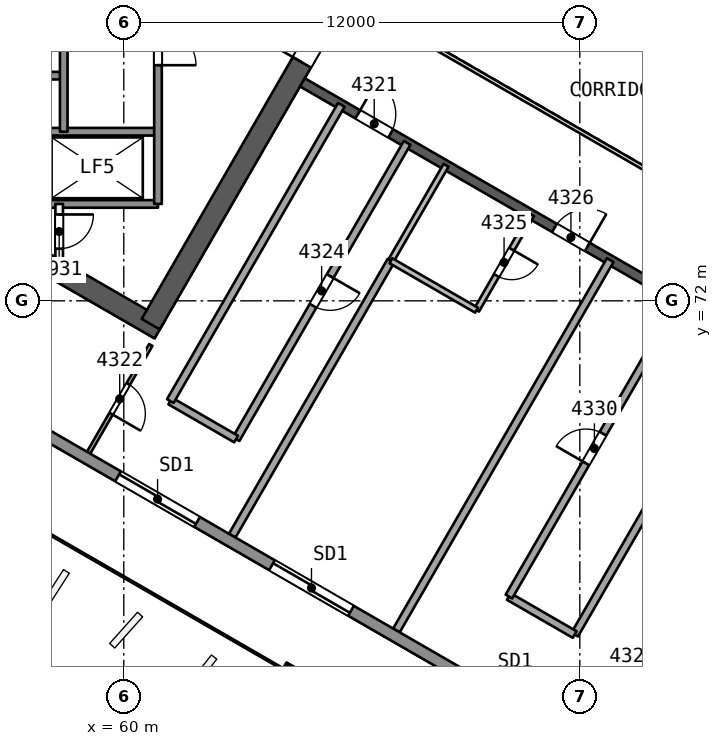
"""IFC4 building model, lengths in metres.
Left out: names, types, materials, properties, quantities, classifications, styles, units other than length and angle.
Written with IfcOpenShell. Run it as: python <this file> out.ifc"""

import sys

from ifc_helpers import new_model, si_unit, direction, frame, frame_2d, origin, origin_2d, place, context, subcontext, project, spatial, rectangle, extrude, element, fill, save


model = new_model("IFC4")
c1 = context("Model", 3, precision=1e-05, world=origin(), true_north=direction((0.0, 1.0)))
c2 = subcontext(c1, "Body", "Model", "MODEL_VIEW")
j1 = project(units=[si_unit("LENGTHUNIT", "METRE"), si_unit("PLANEANGLEUNIT", "RADIAN")], contexts=[c1])
p1 = place(None, origin())
s1 = spatial("IfcSite", under=j1, at=p1, CompositionType="ELEMENT")
p2 = place(p1, origin())
s2 = spatial("IfcBuilding", under=s1, at=p2, CompositionType="ELEMENT")
p3 = place(p2, frame((0.0, 0.0, 178.5)))
s3 = spatial("IfcBuildingStorey", under=s2, at=p3, CompositionType="ELEMENT", Elevation=178.5)
p4 = place(p3, frame((48.672, 78.336, 0.0), z_axis=(0.0, 0.0, 1.0), x_axis=(0.866023530946, -0.500003243837, 0.0)))
e1 = element("IfcWall", 1, at=p4, inside=s3, PredefinedType="SHEAR", context=c2, shape_type="SweptSolid", body=[
    extrude(rectangle(XDim=14.175, YDim=0.55, at=frame_2d((7.087, 0.0))), origin(), (0.0, 0.0, 1.0), 3.7),
])
p5 = place(p3, frame((60.709, 71.386, 0.0), z_axis=(0.0, 0.0, 1.0), x_axis=(0.500015938302, 0.866016201606, 0.0)))
e2 = element("IfcWall", 2, at=p5, inside=s3, PredefinedType="SHEAR", context=c2, shape_type="SweptSolid", body=[
    extrude(rectangle(XDim=10.105, YDim=0.55, at=frame_2d((5.053, 0.0))), origin(), (0.0, 0.0, 1.0), 3.7),
])
p6 = place(p5, frame((7.955, 0.0, 0.0)))
e3 = element("IfcOpeningElement", 3, at=p6, cuts=e2, PredefinedType="OPENING", context=c2, shape_type="SweptSolid", body=[
    extrude(rectangle(XDim=1.2, YDim=2.1, at=frame_2d((0.6, 1.05))), frame((0.0, 0.286, 0.0), z_axis=(0.0, -1.0, 0.0), x_axis=(1.0, 0.0, 0.0)), (0.0, 0.0, 1.0), 0.571),
])
p7 = place(p3, frame((64.7, 77.748, 0.0), z_axis=(0.0, 0.0, 1.0), x_axis=(0.866026492143, -0.499998114903, 0.0)))
e4 = element("IfcWall", 4, at=p7, inside=s3, PredefinedType="SHEAR", context=c2, shape_type="SweptSolid", body=[
    extrude(rectangle(XDim=15.588, YDim=0.25, at=frame_2d((7.794, 0.0))), origin(), (0.0, 0.0, 1.0), 3.25),
])
p8 = place(p7, frame((1.682, 0.0, 0.0)))
e5 = element("IfcOpeningElement", 5, at=p8, cuts=e4, PredefinedType="OPENING", context=c2, shape_type="SweptSolid", body=[
    extrude(rectangle(XDim=1.0, YDim=2.1, at=frame_2d((0.5, 1.05))), frame((0.0, 0.135, 0.0), z_axis=(0.0, -1.0, 0.0), x_axis=(1.0, 0.0, 0.0)), (0.0, 0.0, 1.0), 0.271),
])
p9 = place(p7, frame((7.659, 0.0, 0.0)))
e6 = element("IfcOpeningElement", 6, at=p9, cuts=e4, PredefinedType="OPENING", context=c2, shape_type="SweptSolid", body=[
    extrude(rectangle(XDim=1.0, YDim=2.1, at=frame_2d((0.5, 1.05))), frame((0.0, 0.135, 0.0), z_axis=(0.0, -1.0, 0.0), x_axis=(1.0, 0.0, 0.0)), (0.0, 0.0, 1.0), 0.271),
])
p10 = place(p7, frame((11.971, 0.0, 0.0)))
e7 = element("IfcOpeningElement", 7, at=p10, cuts=e4, PredefinedType="OPENING", context=c2, shape_type="SweptSolid", body=[
    extrude(rectangle(XDim=1.0, YDim=2.1, at=frame_2d((0.5, 1.05))), frame((0.0, 0.135, 0.0), z_axis=(0.0, -1.0, 0.0), x_axis=(1.0, 0.0, 0.0)), (0.0, 0.0, 1.0), 0.271),
])
p11 = place(p3, frame((64.474, 61.769, 0.0), z_axis=(0.010093620709, 0.017482414954, 0.999796221231), x_axis=(-0.866025993948, 0.499998977805, 1.48331e-07)))
e8 = element("IfcColumn", 8, at=p11, inside=s3, PredefinedType="COLUMN", context=c2, shape_type="SweptSolid", body=[
    extrude(rectangle(XDim=0.95, YDim=0.95, at=origin_2d()), origin(), (0.0, 0.0, 1.0), 3.701),
])
p12 = place(p3, frame((60.71, 70.838, 0.0), z_axis=(0.0, 0.0, 1.0), x_axis=(-0.499980647919, -0.866036576425, 0.0)))
e9 = element("IfcWall", 9, at=p12, inside=s3, PredefinedType="PARTITIONING", context=c2, shape_type="SweptSolid", body=[
    extrude(rectangle(XDim=3.274, YDim=0.1, at=frame_2d((1.637, 0.0))), origin(), (0.0, 0.0, 1.0), 3.25),
])
p13 = place(p12, frame((1.187, 0.0, 0.0)))
e10 = element("IfcOpeningElement", 10, at=p13, cuts=e9, PredefinedType="OPENING", context=c2, shape_type="SweptSolid", body=[
    extrude(rectangle(XDim=0.9, YDim=2.1, at=frame_2d((0.45, 1.05))), frame((0.0, 0.061, 0.0), z_axis=(0.0, -1.0, 0.0), x_axis=(1.0, 0.0, 0.0)), (0.0, 0.0, 1.0), 0.121),
])
p14 = place(p3, frame((67.456, 76.157, 0.0), z_axis=(0.0, 0.0, 1.0), x_axis=(-0.499990139034, -0.866031096941, 0.0)))
e11 = element("IfcWall", 11, at=p14, inside=s3, PredefinedType="PARTITIONING", context=c2, shape_type="SweptSolid", body=[
    extrude(rectangle(XDim=9.0, YDim=0.2, at=frame_2d((4.5, 0.0))), origin(), (0.0, 0.0, 1.0), 3.25),
])
p15 = place(p14, frame((4.05, 0.0, 0.0)))
e12 = element("IfcOpeningElement", 12, at=p15, cuts=e11, PredefinedType="OPENING", context=c2, shape_type="SweptSolid", body=[
    extrude(rectangle(XDim=0.9, YDim=2.1, at=frame_2d((0.45, 1.05))), frame((0.0, 0.11, 0.0), z_axis=(0.0, -1.0, 0.0), x_axis=(1.0, 0.0, 0.0)), (0.0, 0.0, 1.0), 0.221),
])
p16 = place(p3, frame((62.956, 68.363, 0.0), z_axis=(0.0, 0.0, 1.0), x_axis=(-0.866041268327, 0.499972520799, 0.0)))
e13 = element("IfcWall", 13, at=p16, inside=s3, PredefinedType="PARTITIONING", context=c2, shape_type="SweptSolid", body=[
    extrude(rectangle(XDim=2.0, YDim=0.2, at=frame_2d((1.0, 0.0))), origin(), (0.0, 0.0, 1.0), 3.25),
])
p17 = place(p3, frame((61.224, 69.363, 0.0), z_axis=(0.0, 0.0, 1.0), x_axis=(0.499990139034, 0.866031096941, 0.0)))
e14 = element("IfcWall", 14, at=p17, inside=s3, PredefinedType="PARTITIONING", context=c2, shape_type="SweptSolid", body=[
    extrude(rectangle(XDim=9.0, YDim=0.2, at=frame_2d((4.5, 0.0))), origin(), (0.0, 0.0, 1.0), 3.25),
])
p18 = place(p3, frame((62.854, 65.821, 0.0), z_axis=(0.0, 0.0, 1.0), x_axis=(0.500002444709, 0.866023992326, 0.0)))
e15 = element("IfcWall", 15, at=p18, inside=s3, PredefinedType="PARTITIONING", context=c2, shape_type="SweptSolid", body=[
    extrude(rectangle(XDim=8.353, YDim=0.2, at=frame_2d((4.177, 0.0))), origin(), (0.0, 0.0, 1.0), 3.25),
])
p19 = place(p3, frame((67.03, 73.054, 0.0), z_axis=(0.0, 0.0, 1.0), x_axis=(0.499987231761, 0.866032775405, 0.0)))
e16 = element("IfcWall", 16, at=p19, inside=s3, PredefinedType="PARTITIONING", context=c2, shape_type="SweptSolid", body=[
    extrude(rectangle(XDim=2.9, YDim=0.15, at=frame_2d((1.45, 0.0))), origin(), (0.0, 0.0, 1.0), 3.25),
])
p20 = place(p3, frame((70.732, 74.266, 0.0), z_axis=(0.0, 0.0, 1.0), x_axis=(-0.499987231761, -0.866032775405, 0.0)))
e17 = element("IfcWall", 17, at=p20, inside=s3, PredefinedType="PARTITIONING", context=c2, shape_type="SweptSolid", body=[
    extrude(rectangle(XDim=2.9, YDim=0.15, at=frame_2d((1.45, 0.0))), origin(), (0.0, 0.0, 1.0), 3.25),
])
p21 = place(p20, frame((1.05, 0.0, 0.0)))
e18 = element("IfcOpeningElement", 18, at=p21, cuts=e17, PredefinedType="OPENING", context=c2, shape_type="SweptSolid", body=[
    extrude(rectangle(XDim=0.8, YDim=2.1, at=frame_2d((0.4, 1.05))), frame((0.0, 0.085, 0.0), z_axis=(0.0, -1.0, 0.0), x_axis=(1.0, 0.0, 0.0)), (0.0, 0.0, 1.0), 0.171),
])
p22 = place(p3, frame((69.282, 71.754, 0.0), z_axis=(0.0, 0.0, 1.0), x_axis=(-0.866021400173, 0.500006934395, 0.0)))
e19 = element("IfcWall", 19, at=p22, inside=s3, PredefinedType="PARTITIONING", context=c2, shape_type="SweptSolid", body=[
    extrude(rectangle(XDim=2.6, YDim=0.15, at=frame_2d((1.3, 0.0))), origin(), (0.0, 0.0, 1.0), 3.25),
])
p23 = place(p3, frame((67.174, 63.326, 0.0), z_axis=(0.0, 0.0, 1.0), x_axis=(0.499998524228, 0.86602625582, 0.0)))
e20 = element("IfcWall", 20, at=p23, inside=s3, PredefinedType="PARTITIONING", context=c2, shape_type="SweptSolid", body=[
    extrude(rectangle(XDim=11.253, YDim=0.2, at=frame_2d((5.626, 0.0))), origin(), (0.0, 0.0, 1.0), 3.25),
])
p24 = place(p3, frame((72.573, 60.209, 0.0), z_axis=(0.0, 0.0, 1.0), x_axis=(0.499980647919, 0.866036576425, 0.0)))
e21 = element("IfcWall", 21, at=p24, inside=s3, PredefinedType="PARTITIONING", context=c2, shape_type="SweptSolid", body=[
    extrude(rectangle(XDim=3.274, YDim=0.1, at=frame_2d((1.637, 0.0))), origin(), (0.0, 0.0, 1.0), 3.25),
])
p25 = place(p24, frame((1.187, 0.0, 0.0)))
e22 = element("IfcOpeningElement", 22, at=p25, cuts=e21, PredefinedType="OPENING", context=c2, shape_type="SweptSolid", body=[
    extrude(rectangle(XDim=0.9, YDim=2.1, at=frame_2d((0.45, 1.05))), frame((0.0, 0.061, 0.0), z_axis=(0.0, -1.0, 0.0), x_axis=(1.0, 0.0, 0.0)), (0.0, 0.0, 1.0), 0.121),
])
p26 = place(p3, frame((76.366, 71.013, 0.0), z_axis=(0.0, 0.0, 1.0), x_axis=(-0.5000018851, -0.866024315419, 0.0)))
e23 = element("IfcWall", 23, at=p26, inside=s3, PredefinedType="PARTITIONING", context=c2, shape_type="SweptSolid", body=[
    extrude(rectangle(XDim=9.0, YDim=0.2, at=frame_2d((4.5, 0.0))), origin(), (0.0, 0.0, 1.0), 3.25),
])
p27 = place(p3, frame((71.866, 63.219, 0.0), z_axis=(0.0, 0.0, 1.0), x_axis=(-0.866010750942, 0.50002537861, 0.0)))
e24 = element("IfcWall", 24, at=p27, inside=s3, PredefinedType="PARTITIONING", context=c2, shape_type="SweptSolid", body=[
    extrude(rectangle(XDim=2.0, YDim=0.2, at=frame_2d((1.0, 0.0))), origin(), (0.0, 0.0, 1.0), 3.25),
])
p28 = place(p3, frame((70.134, 64.219, 0.0), z_axis=(0.0, 0.0, 1.0), x_axis=(0.5000018851, 0.866024315419, 0.0)))
e25 = element("IfcWall", 25, at=p28, inside=s3, PredefinedType="PARTITIONING", context=c2, shape_type="SweptSolid", body=[
    extrude(rectangle(XDim=9.0, YDim=0.2, at=frame_2d((4.5, 0.0))), origin(), (0.0, 0.0, 1.0), 3.25),
])
p29 = place(p28, frame((4.05, 0.0, 0.0)))
e26 = element("IfcOpeningElement", 26, at=p29, cuts=e25, PredefinedType="OPENING", context=c2, shape_type="SweptSolid", body=[
    extrude(rectangle(XDim=0.9, YDim=2.1, at=frame_2d((0.45, 1.05))), frame((0.0, 0.11, 0.0), z_axis=(0.0, -1.0, 0.0), x_axis=(1.0, 0.0, 0.0)), (0.0, 0.0, 1.0), 0.221),
])
p30 = place(p3, frame((88.788, 50.676, 0.0), z_axis=(0.0, 0.0, 1.0), x_axis=(-0.866026647012, 0.499997846661, 0.0)))
e27 = element("IfcWall", 27, at=p30, inside=s3, PredefinedType="SOLIDWALL", context=c2, shape_type="SweptSolid", body=[
    extrude(rectangle(XDim=53.206, YDim=0.3, at=frame_2d((26.603, 0.0))), origin(), (0.0, 0.0, 1.0), 3.25),
])
p31 = place(p30, frame((31.015, 0.0, 0.0)))
e28 = element("IfcOpeningElement", 28, at=p31, cuts=e27, PredefinedType="OPENING", context=c2, shape_type="SweptSolid", body=[
    extrude(rectangle(XDim=2.4, YDim=2.4, at=frame_2d((1.2, 1.2))), frame((0.0, 0.161, 0.0), z_axis=(0.0, -1.0, 0.0), x_axis=(1.0, 0.0, 0.0)), (0.0, 0.0, 1.0), 0.321),
])
p32 = place(p30, frame((41.356, 0.0, 0.0)))
e29 = element("IfcOpeningElement", 29, at=p32, cuts=e27, PredefinedType="OPENING", context=c2, shape_type="SweptSolid", body=[
    extrude(rectangle(XDim=2.4, YDim=2.4, at=frame_2d((1.2, 1.2))), frame((0.0, 0.161, 0.0), z_axis=(0.0, -1.0, 0.0), x_axis=(1.0, 0.0, 0.0)), (0.0, 0.0, 1.0), 0.321),
])
p33 = place(p30, frame((20.726, 0.0, 0.0)))
e30 = element("IfcOpeningElement", 30, at=p33, cuts=e27, PredefinedType="OPENING", context=c2, shape_type="SweptSolid", body=[
    extrude(rectangle(XDim=2.4, YDim=2.4, at=frame_2d((1.2, 1.2))), frame((0.0, 0.161, 0.0), z_axis=(0.0, -1.0, 0.0), x_axis=(1.0, 0.0, 0.0)), (0.0, 0.0, 1.0), 0.321),
])
p34 = place(p30, frame((9.4, 0.0, 0.0)))
e31 = element("IfcOpeningElement", 31, at=p34, cuts=e27, PredefinedType="OPENING", context=c2, shape_type="SweptSolid", body=[
    extrude(rectangle(XDim=2.4, YDim=2.4, at=frame_2d((1.2, 1.2))), frame((0.0, 0.161, 0.0), z_axis=(0.0, -1.0, 0.0), x_axis=(1.0, 0.0, 0.0)), (0.0, 0.0, 1.0), 0.321),
])
p35 = place(p30, frame((26.338, 0.0, 0.0)))
e32 = element("IfcOpeningElement", 32, at=p35, cuts=e27, PredefinedType="OPENING", context=c2, shape_type="SweptSolid", body=[
    extrude(rectangle(XDim=2.4, YDim=2.4, at=frame_2d((1.2, 1.2))), frame((0.0, 0.161, 0.0), z_axis=(0.0, -1.0, 0.0), x_axis=(1.0, 0.0, 0.0)), (0.0, 0.0, 1.0), 0.321),
])
p36 = place(p3, frame((58.42, 77.925, 0.0), z_axis=(0.0, 0.0, 1.0), x_axis=(-1.0, 0.0, 0.0)))
e33 = element("IfcWall", 33, at=p36, inside=s3, PredefinedType="SOLIDWALL", context=c2, shape_type="SweptSolid", body=[
    extrude(rectangle(XDim=7.7, YDim=0.2, at=frame_2d((3.85, 0.0))), origin(), (0.0, 0.0, 1.0), 3.25),
])
p37 = place(p36, frame((0.55, 0.0, 0.0)))
e34 = element("IfcOpeningElement", 34, at=p37, cuts=e33, PredefinedType="OPENING", context=c2, shape_type="SweptSolid", body=[
    extrude(rectangle(XDim=1.1, YDim=2.1, at=frame_2d((0.55, 1.05))), frame((0.0, 0.11, 0.0), z_axis=(0.0, -1.0, 0.0), x_axis=(1.0, 0.0, 0.0)), (0.0, 0.0, 1.0), 0.221),
])
for number, where, z_axis, x_axis in (
    (35, (60.9, 76.45, 0.0), (0.0, 0.0, 1.0), (-1.0, 0.0, 0.0)),
    (36, (60.9, 74.55, 0.0), (0.0, 0.0, 1.0), (-1.0, 0.0, 0.0)),
):
    element("IfcWall", number, at=place(p3, frame(where, z_axis=z_axis, x_axis=x_axis)), inside=s3, PredefinedType="SOLIDWALL", context=c2, shape_type="SweptSolid", body=[
        extrude(rectangle(XDim=3.05, YDim=0.2, at=frame_2d((1.525, 0.0))), origin(), (0.0, 0.0, 1.0), 3.25),
    ])
p38 = place(p3, frame((60.9, 85.45, 0.0), z_axis=(0.0, 0.0, 1.0), x_axis=(0.0, -1.0, 0.0)))
e37 = element("IfcWall", 37, at=p38, inside=s3, PredefinedType="SOLIDWALL", context=c2, shape_type="SweptSolid", body=[
    extrude(rectangle(XDim=10.9, YDim=0.2, at=frame_2d((5.45, 0.0))), origin(), (0.0, 0.0, 1.0), 3.25),
])
p39 = place(p38, frame((0.625, 0.0, 0.0)))
e38 = element("IfcOpeningElement", 38, at=p39, cuts=e37, PredefinedType="OPENING", context=c2, shape_type="SweptSolid", body=[
    extrude(rectangle(XDim=1.0, YDim=2.1, at=frame_2d((0.5, 1.05))), frame((0.0, 0.11, 0.0), z_axis=(0.0, -1.0, 0.0), x_axis=(1.0, 0.0, 0.0)), (0.0, 0.0, 1.0), 0.221),
])
p40 = place(p38, frame((2.875, 0.0, 0.0)))
e39 = element("IfcOpeningElement", 39, at=p40, cuts=e37, PredefinedType="OPENING", context=c2, shape_type="SweptSolid", body=[
    extrude(rectangle(XDim=1.0, YDim=2.1, at=frame_2d((0.5, 1.05))), frame((0.0, 0.11, 0.0), z_axis=(0.0, -1.0, 0.0), x_axis=(1.0, 0.0, 0.0)), (0.0, 0.0, 1.0), 0.221),
])
p41 = place(p38, frame((6.25, 0.0, 0.0)))
e40 = element("IfcOpeningElement", 40, at=p41, cuts=e37, PredefinedType="OPENING", context=c2, shape_type="SweptSolid", body=[
    extrude(rectangle(XDim=1.0, YDim=2.1, at=frame_2d((0.5, 1.05))), frame((0.0, 0.11, 0.0), z_axis=(0.0, -1.0, 0.0), x_axis=(1.0, 0.0, 0.0)), (0.0, 0.0, 1.0), 0.221),
])
p42 = place(p3, frame((58.42, 86.974, 0.0), z_axis=(0.0, 0.0, 1.0), x_axis=(0.0, -1.0, 0.0)))
e41 = element("IfcWall", 41, at=p42, inside=s3, PredefinedType="SOLIDWALL", context=c2, shape_type="SweptSolid", body=[
    extrude(rectangle(XDim=10.524, YDim=0.2, at=frame_2d((5.262, 0.0))), origin(), (0.0, 0.0, 1.0), 3.25),
])
p43 = place(p42, frame((0.312, 0.0, 0.0)))
e42 = element("IfcOpeningElement", 42, at=p43, cuts=e41, PredefinedType="OPENING", context=c2, shape_type="SweptSolid", body=[
    extrude(rectangle(XDim=0.9, YDim=2.1, at=frame_2d((0.45, 1.05))), frame((0.0, 0.11, 0.0), z_axis=(0.0, -1.0, 0.0), x_axis=(1.0, 0.0, 0.0)), (0.0, 0.0, 1.0), 0.221),
])
p44 = place(p3, frame((58.3, 74.55, 0.0), z_axis=(0.0, 0.0, 1.0), x_axis=(0.0, -1.0, 0.0)))
e43 = element("IfcWall", 43, at=p44, inside=s3, PredefinedType="PARTITIONING", context=c2, shape_type="SweptSolid", body=[
    extrude(rectangle(XDim=1.455, YDim=0.2, at=frame_2d((0.728, 0.0))), origin(), (0.0, 0.0, 1.0), 3.25),
])
p45 = place(p44, frame((0.278, 0.0, 0.0)))
e44 = element("IfcOpeningElement", 44, at=p45, cuts=e43, PredefinedType="OPENING", context=c2, shape_type="SweptSolid", body=[
    extrude(rectangle(XDim=0.9, YDim=2.1, at=frame_2d((0.45, 1.05))), frame((0.0, 0.11, 0.0), z_axis=(0.0, -1.0, 0.0), x_axis=(1.0, 0.0, 0.0)), (0.0, 0.0, 1.0), 0.221),
])
p46 = place(p3, frame((67.702, 78.948, 0.0), z_axis=(0.0, 0.0, 1.0), x_axis=(0.866026658274, -0.499997827154, 0.0)))
e45 = element("IfcWall", 45, at=p46, inside=s3, PredefinedType="PARTITIONING", context=c2, shape_type="SweptSolid", body=[
    extrude(rectangle(XDim=11.588, YDim=0.1, at=frame_2d((5.794, 0.0))), origin(), (0.0, 0.0, 1.0), 3.25),
])
p47 = place(p8, origin())
e46 = element("IfcDoor", 46, at=p47, inside=s3, OperationType="SINGLE_SWING_LEFT", PredefinedType="NOTDEFINED", context=c2, shape_type="SweptSolid", body=[
    extrude(rectangle(XDim=1.0, YDim=2.1, at=frame_2d((0.5, 1.05))), frame((0.0, 0.025, 0.0), z_axis=(0.0, -1.0, 0.0), x_axis=(1.0, 0.0, 0.0)), (0.0, 0.0, 1.0), 0.05),
])
fill(e5, e46)
p48 = place(p13, origin())
e47 = element("IfcDoor", 47, at=p48, inside=s3, OperationType="SINGLE_SWING_RIGHT", PredefinedType="NOTDEFINED", context=c2, shape_type="SweptSolid", body=[
    extrude(rectangle(XDim=0.9, YDim=2.1, at=frame_2d((0.45, 1.05))), frame((0.0, 0.025, 0.0), z_axis=(0.0, -1.0, 0.0), x_axis=(1.0, 0.0, 0.0)), (0.0, 0.0, 1.0), 0.05),
])
fill(e10, e47)
p49 = place(p15, origin())
e48 = element("IfcDoor", 48, at=p49, inside=s3, OperationType="SINGLE_SWING_LEFT", PredefinedType="NOTDEFINED", context=c2, shape_type="SweptSolid", body=[
    extrude(rectangle(XDim=0.9, YDim=2.1, at=frame_2d((0.45, 1.05))), frame((0.0, 0.025, 0.0), z_axis=(0.0, -1.0, 0.0), x_axis=(1.0, 0.0, 0.0)), (0.0, 0.0, 1.0), 0.05),
])
fill(e12, e48)
p50 = place(p21, origin())
e49 = element("IfcDoor", 49, at=p50, inside=s3, OperationType="SINGLE_SWING_LEFT", PredefinedType="NOTDEFINED", context=c2, shape_type="SweptSolid", body=[
    extrude(rectangle(XDim=0.8, YDim=2.1, at=frame_2d((0.4, 1.05))), frame((0.0, 0.025, 0.0), z_axis=(0.0, -1.0, 0.0), x_axis=(1.0, 0.0, 0.0)), (0.0, 0.0, 1.0), 0.05),
])
fill(e18, e49)
p51 = place(p9, origin())
e50 = element("IfcDoor", 50, at=p51, inside=s3, OperationType="SINGLE_SWING_RIGHT", PredefinedType="NOTDEFINED", context=c2, shape_type="SweptSolid", body=[
    extrude(rectangle(XDim=1.0, YDim=2.1, at=frame_2d((0.5, 1.05))), frame((0.0, 0.025, 0.0), z_axis=(0.0, -1.0, 0.0), x_axis=(1.0, 0.0, 0.0)), (0.0, 0.0, 1.0), 0.05),
])
fill(e6, e50)
p52 = place(p29, origin())
e51 = element("IfcDoor", 51, at=p52, inside=s3, OperationType="SINGLE_SWING_LEFT", PredefinedType="NOTDEFINED", context=c2, shape_type="SweptSolid", body=[
    extrude(rectangle(XDim=0.9, YDim=2.1, at=frame_2d((0.45, 1.05))), frame((0.0, 0.025, 0.0), z_axis=(0.0, -1.0, 0.0), x_axis=(1.0, 0.0, 0.0)), (0.0, 0.0, 1.0), 0.05),
])
fill(e26, e51)
p53 = place(p31, origin())
e52 = element("IfcDoor", 52, at=p53, inside=s3, OperationType="SLIDING_TO_LEFT", PredefinedType="NOTDEFINED", context=c2, shape_type="SweptSolid", body=[
    extrude(rectangle(XDim=2.4, YDim=2.4, at=frame_2d((1.2, 1.2))), frame((0.0, 0.025, 0.0), z_axis=(0.0, -1.0, 0.0), x_axis=(1.0, 0.0, 0.0)), (0.0, 0.0, 1.0), 0.05),
])
fill(e28, e52)
p54 = place(p35, origin())
e53 = element("IfcDoor", 53, at=p54, inside=s3, OperationType="SLIDING_TO_LEFT", PredefinedType="NOTDEFINED", context=c2, shape_type="SweptSolid", body=[
    extrude(rectangle(XDim=2.4, YDim=2.4, at=frame_2d((1.2, 1.2))), frame((0.0, 0.025, 0.0), z_axis=(0.0, -1.0, 0.0), x_axis=(1.0, 0.0, 0.0)), (0.0, 0.0, 1.0), 0.05),
])
fill(e32, e53)
p55 = place(p6, origin())
e54 = element("IfcDoor", 54, at=p55, inside=s3, OperationType="SINGLE_SWING_LEFT", PredefinedType="NOTDEFINED", context=c2, shape_type="SweptSolid", body=[
    extrude(rectangle(XDim=1.2, YDim=2.1, at=frame_2d((0.6, 1.05))), frame((0.0, 0.025, 0.0), z_axis=(0.0, -1.0, 0.0), x_axis=(1.0, 0.0, 0.0)), (0.0, 0.0, 1.0), 0.05),
])
fill(e3, e54)
p56 = place(p41, origin())
e55 = element("IfcDoor", 55, at=p56, inside=s3, OperationType="SINGLE_SWING_RIGHT", PredefinedType="NOTDEFINED", context=c2, shape_type="SweptSolid", body=[
    extrude(rectangle(XDim=1.0, YDim=2.1, at=frame_2d((0.5, 1.05))), frame((0.0, 0.025, 0.0), z_axis=(0.0, -1.0, 0.0), x_axis=(1.0, 0.0, 0.0)), (0.0, 0.0, 1.0), 0.05),
])
fill(e40, e55)
p57 = place(p45, origin())
e56 = element("IfcDoor", 56, at=p57, inside=s3, OperationType="SINGLE_SWING_LEFT", PredefinedType="NOTDEFINED", context=c2, shape_type="SweptSolid", body=[
    extrude(rectangle(XDim=0.9, YDim=2.1, at=frame_2d((0.45, 1.05))), frame((0.0, 0.025, 0.0), z_axis=(0.0, -1.0, 0.0), x_axis=(1.0, 0.0, 0.0)), (0.0, 0.0, 1.0), 0.05),
])
fill(e44, e56)
save(model, sys.argv[1])
